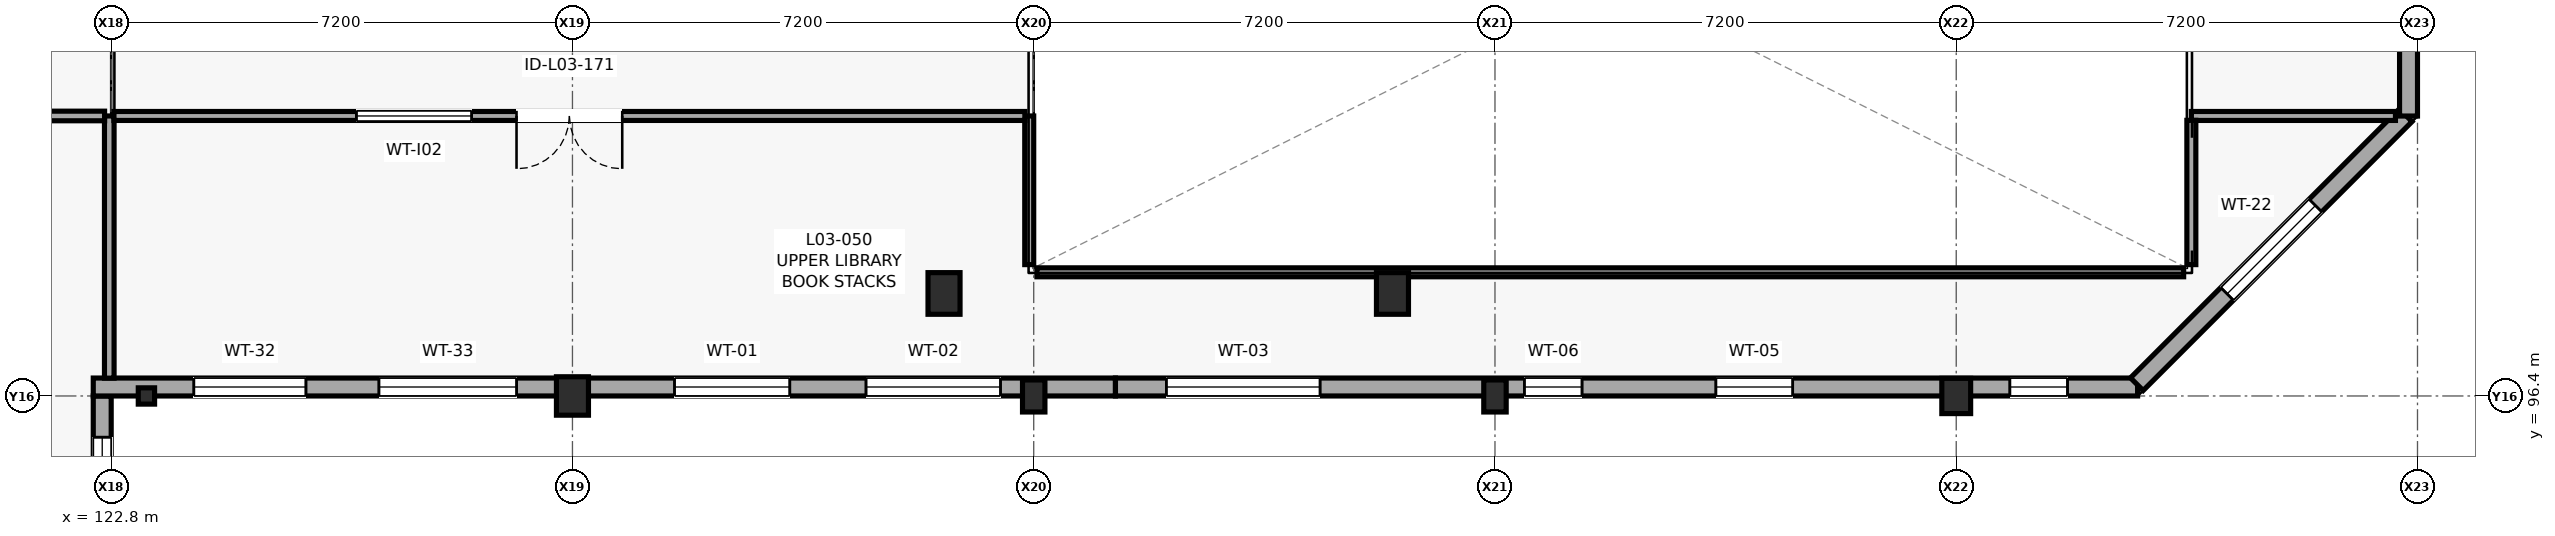
"""IFC4 building model, lengths in metres.
Left out: names, types, materials, properties, quantities, classifications, styles, units other than length and angle.
Written with IfcOpenShell. Run it as: python <this file> out.ifc"""

import sys

from ifc_helpers import new_model, si_unit, direction, frame, frame_2d, origin, origin_2d, place, context, subcontext, project, spatial, rectangle, i_section, extrude, element, fill, save


model = new_model("IFC4")
c1 = context("Model", 3, precision=1e-05, world=origin(), true_north=direction((0.0, 1.0)))
c2 = subcontext(c1, "Body", "Model", "MODEL_VIEW")
j1 = project(units=[si_unit("LENGTHUNIT", "METRE"), si_unit("PLANEANGLEUNIT", "RADIAN")], contexts=[c1])
p1 = place(None, origin())
s1 = spatial("IfcSite", under=j1, at=p1, CompositionType="ELEMENT")
p2 = place(p1, origin())
s2 = spatial("IfcBuilding", under=s1, at=p2, CompositionType="ELEMENT")
p3 = place(p2, frame((0.0, 0.0, 12.2)))
s3 = spatial("IfcBuildingStorey", under=s2, at=p3, CompositionType="ELEMENT", Elevation=12.2)
p4 = place(p3, frame((123.35, 96.4, 0.0), z_axis=(0.0, 0.0, 1.0), x_axis=(1.0, 0.0, 0.0)))
e1 = element("IfcColumn", 1, at=p4, inside=s3, PredefinedType="COLUMN", context=c2, shape_type="SweptSolid", body=[
    extrude(i_section(OverallWidth=0.255, OverallDepth=0.254, WebThickness=0.009, FlangeThickness=0.014, FilletRadius=0.013, at=origin_2d()), origin(), (0.0, 0.0, 1.0), 4.0),
])
p5 = place(p3, frame((130.0, 96.4, 0.0), z_axis=(0.0, 0.0, 1.0), x_axis=(1.0, 0.0, 0.0)))
e2 = element("IfcColumn", 2, at=p5, inside=s3, PredefinedType="PILASTER", context=c2, shape_type="SweptSolid", body=[
    extrude(rectangle(XDim=0.5, YDim=0.6, at=origin_2d()), origin(), (0.0, 0.0, 1.0), 4.0),
])
p6 = place(p3, frame((135.8, 98.0, 0.0), z_axis=(0.0, 0.0, 1.0), x_axis=(1.0, 0.0, 0.0)))
e3 = element("IfcColumn", 3, at=p6, inside=s3, PredefinedType="COLUMN", context=c2, shape_type="SweptSolid", body=[
    extrude(rectangle(XDim=0.5, YDim=0.65, at=origin_2d()), origin(), (0.0, 0.0, 1.0), 4.0),
])
p7 = place(p3, frame((137.2, 96.4, 0.0), z_axis=(0.0, 0.0, 1.0), x_axis=(1.0, 0.0, 0.0)))
e4 = element("IfcColumn", 4, at=p7, inside=s3, PredefinedType="PILASTER", context=c2, shape_type="SweptSolid", body=[
    extrude(rectangle(XDim=0.35, YDim=0.5, at=origin_2d()), origin(), (0.0, 0.0, 1.0), 4.0),
])
p8 = place(p3, frame((142.8, 98.0, 0.0), z_axis=(0.0, 0.0, 1.0), x_axis=(1.0, 0.0, 0.0)))
e5 = element("IfcColumn", 5, at=p8, inside=s3, PredefinedType="COLUMN", context=c2, shape_type="SweptSolid", body=[
    extrude(rectangle(XDim=0.5, YDim=0.65, at=origin_2d()), origin(), (0.0, 0.0, 1.0), 4.0),
])
p9 = place(p3, frame((144.4, 96.4, 0.0), z_axis=(0.0, 0.0, 1.0), x_axis=(1.0, 0.0, 0.0)))
e6 = element("IfcColumn", 6, at=p9, inside=s3, PredefinedType="PILASTER", context=c2, shape_type="SweptSolid", body=[
    extrude(rectangle(XDim=0.35, YDim=0.5, at=origin_2d()), origin(), (0.0, 0.0, 1.0), 4.0),
])
p10 = place(p3, frame((151.6, 96.4, 0.0), z_axis=(0.0, 0.0, 1.0), x_axis=(1.0, 0.0, 0.0)))
e7 = element("IfcColumn", 7, at=p10, inside=s3, PredefinedType="PILASTER", context=c2, shape_type="SweptSolid", body=[
    extrude(rectangle(XDim=0.45, YDim=0.55, at=origin_2d()), origin(), (0.0, 0.0, 1.0), 4.0),
])
p11 = place(p3, frame((122.66, 84.14, 0.0), z_axis=(0.0, 0.0, 1.0), x_axis=(0.0, 1.0, 0.0)))
e8 = element("IfcWall", 8, at=p11, inside=s3, PredefinedType="SOLIDWALL", context=c2, shape_type="SweptSolid", body=[
    extrude(rectangle(XDim=12.26, YDim=0.28, at=frame_2d((6.13, 0.0))), origin(), (0.0, 0.0, 1.0), 3.165),
])
p12 = place(p11, frame((2.343, 0.0, 0.75)))
e9 = element("IfcOpeningElement", 9, at=p12, cuts=e8, PredefinedType="OPENING", context=c2, shape_type="SweptSolid", body=[
    extrude(rectangle(XDim=1.1, YDim=2.1, at=frame_2d((0.55, 1.05))), frame((0.0, 0.15, 0.0), z_axis=(0.0, -1.0, 0.0), x_axis=(1.0, 0.0, 0.0)), (0.0, 0.0, 1.0), 0.3),
])
p13 = place(p11, frame((5.58, 0.0, 0.75)))
e10 = element("IfcOpeningElement", 10, at=p13, cuts=e8, PredefinedType="OPENING", context=c2, shape_type="SweptSolid", body=[
    extrude(rectangle(XDim=1.1, YDim=2.1, at=frame_2d((0.55, 1.05))), frame((0.0, 0.15, 0.0), z_axis=(0.0, -1.0, 0.0), x_axis=(1.0, 0.0, 0.0)), (0.0, 0.0, 1.0), 0.3),
])
p14 = place(p11, frame((10.517, 0.0, 0.75)))
e11 = element("IfcOpeningElement", 11, at=p14, cuts=e8, PredefinedType="OPENING", context=c2, shape_type="SweptSolid", body=[
    extrude(rectangle(XDim=1.1, YDim=2.1, at=frame_2d((0.55, 1.05))), frame((0.0, 0.15, 0.0), z_axis=(0.0, -1.0, 0.0), x_axis=(1.0, 0.0, 0.0)), (0.0, 0.0, 1.0), 0.3),
])
p15 = place(p3, frame((122.52, 96.54, 0.0), z_axis=(0.0, 0.0, 1.0), x_axis=(1.0, 0.0, 0.0)))
e12 = element("IfcWall", 12, at=p15, inside=s3, PredefinedType="SOLIDWALL", context=c2, shape_type="SweptSolid", body=[
    extrude(rectangle(XDim=15.956, YDim=0.28, at=frame_2d((7.978, 0.0))), origin(), (0.0, 0.0, 1.0), 2.815),
])
p16 = place(p15, frame((1.57, 0.0, 0.65)))
e13 = element("IfcOpeningElement", 13, at=p16, cuts=e12, PredefinedType="OPENING", context=c2, shape_type="SweptSolid", body=[
    extrude(rectangle(XDim=1.75, YDim=2.05, at=frame_2d((0.875, 1.025))), frame((0.0, 0.15, 0.0), z_axis=(0.0, -1.0, 0.0), x_axis=(1.0, 0.0, 0.0)), (0.0, 0.0, 1.0), 0.3),
])
p17 = place(p15, frame((4.459, 0.0, 0.725)))
e14 = element("IfcOpeningElement", 14, at=p17, cuts=e12, PredefinedType="OPENING", context=c2, shape_type="SweptSolid", body=[
    extrude(rectangle(XDim=2.15, YDim=1.95, at=frame_2d((1.075, 0.975))), frame((0.0, 0.15, 0.0), z_axis=(0.0, -1.0, 0.0), x_axis=(1.0, 0.0, 0.0)), (0.0, 0.0, 1.0), 0.3),
])
p18 = place(p15, frame((9.073, 0.0, 0.85)))
e15 = element("IfcOpeningElement", 15, at=p18, cuts=e12, PredefinedType="OPENING", context=c2, shape_type="SweptSolid", body=[
    extrude(rectangle(XDim=1.8, YDim=1.8, at=frame_2d((0.9, 0.9))), frame((0.0, 0.15, 0.0), z_axis=(0.0, -1.0, 0.0), x_axis=(1.0, 0.0, 0.0)), (0.0, 0.0, 1.0), 0.3),
])
p19 = place(p15, frame((12.062, 0.0, 0.85)))
e16 = element("IfcOpeningElement", 16, at=p19, cuts=e12, PredefinedType="OPENING", context=c2, shape_type="SweptSolid", body=[
    extrude(rectangle(XDim=2.1, YDim=1.8, at=frame_2d((1.05, 0.9))), frame((0.0, 0.15, 0.0), z_axis=(0.0, -1.0, 0.0), x_axis=(1.0, 0.0, 0.0)), (0.0, 0.0, 1.0), 0.3),
])
p20 = place(p3, frame((138.476, 96.54, 0.0), z_axis=(0.0, 0.0, 1.0), x_axis=(1.0, 0.0, 0.0)))
e17 = element("IfcWall", 17, at=p20, inside=s3, PredefinedType="SOLIDWALL", context=c2, shape_type="SweptSolid", body=[
    extrude(rectangle(XDim=15.955, YDim=0.28, at=frame_2d((7.978, 0.0))), origin(), (0.0, 0.0, 1.0), 2.815),
])
p21 = place(p20, frame((0.794, 0.0, 0.825)))
e18 = element("IfcOpeningElement", 18, at=p21, cuts=e17, PredefinedType="OPENING", context=c2, shape_type="SweptSolid", body=[
    extrude(rectangle(XDim=2.4, YDim=1.85, at=frame_2d((1.2, 0.925))), frame((0.0, 0.15, 0.0), z_axis=(0.0, -1.0, 0.0), x_axis=(1.0, 0.0, 0.0)), (0.0, 0.0, 1.0), 0.3),
])
p22 = place(p20, frame((6.383, 0.0, 1.05)))
e19 = element("IfcOpeningElement", 19, at=p22, cuts=e17, PredefinedType="OPENING", context=c2, shape_type="SweptSolid", body=[
    extrude(rectangle(XDim=0.9, YDim=1.5, at=frame_2d((0.45, 0.75))), frame((0.0, 0.15, 0.0), z_axis=(0.0, -1.0, 0.0), x_axis=(1.0, 0.0, 0.0)), (0.0, 0.0, 1.0), 0.3),
])
p23 = place(p20, frame((9.372, 0.0, 0.85)))
e20 = element("IfcOpeningElement", 20, at=p23, cuts=e17, PredefinedType="OPENING", context=c2, shape_type="SweptSolid", body=[
    extrude(rectangle(XDim=1.2, YDim=1.65, at=frame_2d((0.6, 0.825))), frame((0.0, 0.15, 0.0), z_axis=(0.0, -1.0, 0.0), x_axis=(1.0, 0.0, 0.0)), (0.0, 0.0, 1.0), 0.3),
])
p24 = place(p20, frame((13.961, 0.0, 1.05)))
e21 = element("IfcOpeningElement", 21, at=p24, cuts=e17, PredefinedType="OPENING", context=c2, shape_type="SweptSolid", body=[
    extrude(rectangle(XDim=0.9, YDim=1.5, at=frame_2d((0.45, 0.75))), frame((0.0, 0.15, 0.0), z_axis=(0.0, -1.0, 0.0), x_axis=(1.0, 0.0, 0.0)), (0.0, 0.0, 1.0), 0.3),
])
p25 = place(p3, frame((154.419, 96.584, 0.0), z_axis=(0.0, 0.0, 1.0), x_axis=(0.707106781187, 0.707106781187, 0.0)))
e22 = element("IfcWall", 22, at=p25, inside=s3, PredefinedType="SOLIDWALL", context=c2, shape_type="SweptSolid", body=[
    extrude(rectangle(XDim=5.936, YDim=0.28, at=frame_2d((2.968, 0.0))), origin(), (0.0, 0.0, 1.0), 3.78),
])
p26 = place(p25, frame((1.993, 0.0, 1.05)))
e23 = element("IfcOpeningElement", 23, at=p26, cuts=e22, PredefinedType="OPENING", context=c2, shape_type="SweptSolid", body=[
    extrude(rectangle(XDim=1.95, YDim=1.5, at=frame_2d((0.975, 0.75))), frame((0.0, 0.15, 0.0), z_axis=(0.0, -1.0, 0.0), x_axis=(1.0, 0.0, 0.0)), (0.0, 0.0, 1.0), 0.3),
])
p27 = place(p3, frame((158.66, 100.769, 0.0), z_axis=(0.0, 0.0, 1.0), x_axis=(0.0, 1.0, 0.0)))
e24 = element("IfcWall", 24, at=p27, inside=s3, PredefinedType="SOLIDWALL", context=c2, shape_type="SweptSolid", body=[
    extrude(rectangle(XDim=6.862, YDim=0.28, at=frame_2d((3.431, 0.0))), origin(), (0.0, 0.0, 1.0), 3.78),
])
p28 = place(p27, frame((1.065, 0.0, 1.05)))
e25 = element("IfcOpeningElement", 25, at=p28, cuts=e24, PredefinedType="OPENING", context=c2, shape_type="SweptSolid", body=[
    extrude(rectangle(XDim=1.3, YDim=1.6, at=frame_2d((0.65, 0.8))), frame((0.0, 0.15, 0.0), z_axis=(0.0, -1.0, 0.0), x_axis=(1.0, 0.0, 0.0)), (0.0, 0.0, 1.0), 0.3),
])
p29 = place(p27, frame((4.421, 0.0, 0.85)))
e26 = element("IfcOpeningElement", 26, at=p29, cuts=e24, PredefinedType="OPENING", context=c2, shape_type="SweptSolid", body=[
    extrude(rectangle(XDim=1.45, YDim=1.7, at=frame_2d((0.725, 0.85))), frame((0.0, 0.15, 0.0), z_axis=(0.0, -1.0, 0.0), x_axis=(1.0, 0.0, 0.0)), (0.0, 0.0, 1.0), 0.3),
])
p30 = place(p3, frame((122.77, 96.678, 0.0), z_axis=(0.0, 0.0, 1.0), x_axis=(0.0, 1.0, 0.0)))
e27 = element("IfcWall", 27, at=p30, inside=s3, PredefinedType="PARTITIONING", context=c2, shape_type="SweptSolid", body=[
    extrude(rectangle(XDim=4.092, YDim=0.15, at=frame_2d((2.046, 0.0))), origin(), (0.0, 0.0, 1.0), 3.715),
])
p31 = place(p3, frame((122.697, 100.77, 0.0), z_axis=(0.0, 0.0, 1.0), x_axis=(-1.0, 0.0, 0.0)))
e28 = element("IfcWall", 28, at=p31, inside=s3, PredefinedType="PARTITIONING", context=c2, shape_type="SweptSolid", body=[
    extrude(rectangle(XDim=4.009, YDim=0.15, at=frame_2d((2.004, 0.0))), origin(), (0.0, 0.0, 1.0), 3.715),
])
p32 = place(p3, frame((137.13, 98.45, 0.0), z_axis=(0.0, 0.0, 1.0), x_axis=(0.0, 1.0, 0.0)))
e29 = element("IfcWall", 29, at=p32, inside=s3, PredefinedType="PARTITIONING", context=c2, shape_type="SweptSolid", body=[
    extrude(rectangle(XDim=2.32, YDim=0.14, at=frame_2d((1.16, 0.0))), origin(), (0.0, 0.0, 1.0), 3.165),
])
p33 = place(p3, frame((137.062, 100.77, 0.0), z_axis=(0.0, 0.0, 1.0), x_axis=(-1.0, 0.0, 0.0)))
e30 = element("IfcWall", 30, at=p33, inside=s3, PredefinedType="PARTITIONING", context=c2, shape_type="SweptSolid", body=[
    extrude(rectangle(XDim=14.219, YDim=0.14, at=frame_2d((7.109, 0.0))), origin(), (0.0, 0.0, 1.0), 3.715),
])
p34 = place(p33, frame((6.285, 0.0, 0.0)))
e31 = element("IfcOpeningElement", 31, at=p34, cuts=e30, PredefinedType="OPENING", context=c2, shape_type="SweptSolid", body=[
    extrude(rectangle(XDim=1.65, YDim=2.32, at=frame_2d((0.825, 1.16))), frame((0.0, 0.08, 0.0), z_axis=(0.0, -1.0, 0.0), x_axis=(1.0, 0.0, 0.0)), (0.0, 0.0, 1.0), 0.16),
])
p35 = place(p33, frame((8.635, 0.0, 1.05)))
e32 = element("IfcOpeningElement", 32, at=p35, cuts=e30, PredefinedType="OPENING", context=c2, shape_type="SweptSolid", body=[
    extrude(rectangle(XDim=1.8, YDim=1.2, at=frame_2d((0.9, 0.6))), frame((0.0, 0.08, 0.0), z_axis=(0.0, -1.0, 0.0), x_axis=(1.0, 0.0, 0.0)), (0.0, 0.0, 1.0), 0.16),
])
p36 = place(p3, frame((158.456, 100.77, 0.0), z_axis=(0.0, 0.0, 1.0), x_axis=(-1.0, 0.0, 0.0)))
e33 = element("IfcWall", 33, at=p36, inside=s3, PredefinedType="PARTITIONING", context=c2, shape_type="SweptSolid", body=[
    extrude(rectangle(XDim=3.186, YDim=0.14, at=frame_2d((1.593, 0.0))), origin(), (0.0, 0.0, 1.0), 3.715),
])
p37 = place(p3, frame((155.27, 100.702, 0.0), z_axis=(0.0, 0.0, 1.0), x_axis=(0.0, -1.0, 0.0)))
e34 = element("IfcWall", 34, at=p37, inside=s3, PredefinedType="PARTITIONING", context=c2, shape_type="SweptSolid", body=[
    extrude(rectangle(XDim=2.252, YDim=0.14, at=frame_2d((1.126, 0.0))), origin(), (0.0, 0.0, 1.0), 3.715),
])
p38 = place(p3, frame((155.15, 98.33, 0.0), z_axis=(0.0, 0.0, 1.0), x_axis=(-1.0, 0.0, 0.0)))
e35 = element("IfcWall", 35, at=p38, inside=s3, PredefinedType="PARTITIONING", context=c2, shape_type="SweptSolid", body=[
    extrude(rectangle(XDim=17.9, YDim=0.14, at=frame_2d((8.95, 0.0))), origin(), (0.0, 0.0, 1.0), 3.715),
])
p39 = place(p14, origin())
e36 = element("IfcWindow", 36, at=p39, inside=s3, PartitioningType="SINGLE_PANEL", PredefinedType="WINDOW", context=c2, shape_type="SweptSolid", body=[
    extrude(rectangle(XDim=1.1, YDim=2.1, at=frame_2d((0.55, 1.05))), frame((0.0, 0.03, 0.0), z_axis=(0.0, -1.0, 0.0), x_axis=(1.0, 0.0, 0.0)), (0.0, 0.0, 1.0), 0.06),
])
fill(e11, e36)
p40 = place(p16, origin())
e37 = element("IfcWindow", 37, at=p40, inside=s3, PartitioningType="SINGLE_PANEL", PredefinedType="WINDOW", context=c2, shape_type="SweptSolid", body=[
    extrude(rectangle(XDim=1.75, YDim=2.05, at=frame_2d((0.875, 1.025))), frame((0.0, 0.03, 0.0), z_axis=(0.0, -1.0, 0.0), x_axis=(1.0, 0.0, 0.0)), (0.0, 0.0, 1.0), 0.06),
])
fill(e13, e37)
p41 = place(p17, origin())
e38 = element("IfcWindow", 38, at=p41, inside=s3, PartitioningType="SINGLE_PANEL", PredefinedType="WINDOW", context=c2, shape_type="SweptSolid", body=[
    extrude(rectangle(XDim=2.15, YDim=1.95, at=frame_2d((1.075, 0.975))), frame((0.0, 0.03, 0.0), z_axis=(0.0, -1.0, 0.0), x_axis=(1.0, 0.0, 0.0)), (0.0, 0.0, 1.0), 0.06),
])
fill(e14, e38)
p42 = place(p18, origin())
e39 = element("IfcWindow", 39, at=p42, inside=s3, PartitioningType="SINGLE_PANEL", PredefinedType="WINDOW", context=c2, shape_type="SweptSolid", body=[
    extrude(rectangle(XDim=1.8, YDim=1.8, at=frame_2d((0.9, 0.9))), frame((0.0, 0.03, 0.0), z_axis=(0.0, -1.0, 0.0), x_axis=(1.0, 0.0, 0.0)), (0.0, 0.0, 1.0), 0.06),
])
fill(e15, e39)
p43 = place(p19, origin())
e40 = element("IfcWindow", 40, at=p43, inside=s3, PartitioningType="SINGLE_PANEL", PredefinedType="WINDOW", context=c2, shape_type="SweptSolid", body=[
    extrude(rectangle(XDim=2.1, YDim=1.8, at=frame_2d((1.05, 0.9))), frame((0.0, 0.03, 0.0), z_axis=(0.0, -1.0, 0.0), x_axis=(1.0, 0.0, 0.0)), (0.0, 0.0, 1.0), 0.06),
])
fill(e16, e40)
p44 = place(p21, origin())
e41 = element("IfcWindow", 41, at=p44, inside=s3, PartitioningType="SINGLE_PANEL", PredefinedType="WINDOW", context=c2, shape_type="SweptSolid", body=[
    extrude(rectangle(XDim=2.4, YDim=1.85, at=frame_2d((1.2, 0.925))), frame((0.0, 0.03, 0.0), z_axis=(0.0, -1.0, 0.0), x_axis=(1.0, 0.0, 0.0)), (0.0, 0.0, 1.0), 0.06),
])
fill(e18, e41)
p45 = place(p22, origin())
e42 = element("IfcWindow", 42, at=p45, inside=s3, PartitioningType="SINGLE_PANEL", PredefinedType="WINDOW", context=c2, shape_type="SweptSolid", body=[
    extrude(rectangle(XDim=0.9, YDim=1.5, at=frame_2d((0.45, 0.75))), frame((0.0, 0.03, 0.0), z_axis=(0.0, -1.0, 0.0), x_axis=(1.0, 0.0, 0.0)), (0.0, 0.0, 1.0), 0.06),
])
fill(e19, e42)
p46 = place(p23, origin())
e43 = element("IfcWindow", 43, at=p46, inside=s3, PartitioningType="SINGLE_PANEL", PredefinedType="WINDOW", context=c2, shape_type="SweptSolid", body=[
    extrude(rectangle(XDim=1.2, YDim=1.65, at=frame_2d((0.6, 0.825))), frame((0.0, 0.03, 0.0), z_axis=(0.0, -1.0, 0.0), x_axis=(1.0, 0.0, 0.0)), (0.0, 0.0, 1.0), 0.06),
])
fill(e20, e43)
p47 = place(p24, origin())
e44 = element("IfcWindow", 44, at=p47, inside=s3, PartitioningType="SINGLE_PANEL", PredefinedType="WINDOW", context=c2, shape_type="SweptSolid", body=[
    extrude(rectangle(XDim=0.9, YDim=1.5, at=frame_2d((0.45, 0.75))), frame((0.0, 0.03, 0.0), z_axis=(0.0, -1.0, 0.0), x_axis=(1.0, 0.0, 0.0)), (0.0, 0.0, 1.0), 0.06),
])
fill(e21, e44)
p48 = place(p26, origin())
e45 = element("IfcWindow", 45, at=p48, inside=s3, PartitioningType="SINGLE_PANEL", PredefinedType="WINDOW", context=c2, shape_type="SweptSolid", body=[
    extrude(rectangle(XDim=1.95, YDim=1.5, at=frame_2d((0.975, 0.75))), frame((0.0, 0.03, 0.0), z_axis=(0.0, -1.0, 0.0), x_axis=(1.0, 0.0, 0.0)), (0.0, 0.0, 1.0), 0.06),
])
fill(e23, e45)
p49 = place(p34, origin())
e46 = element("IfcDoor", 46, at=p49, inside=s3, OperationType="DOUBLE_DOOR_SINGLE_SWING", PredefinedType="DOOR", context=c2, shape_type="SweptSolid", body=[
    extrude(rectangle(XDim=1.65, YDim=2.32, at=frame_2d((0.825, 1.16))), frame((0.0, 0.025, 0.0), z_axis=(0.0, -1.0, 0.0), x_axis=(1.0, 0.0, 0.0)), (0.0, 0.0, 1.0), 0.05),
])
fill(e31, e46)
p50 = place(p35, origin())
e47 = element("IfcWindow", 47, at=p50, inside=s3, PartitioningType="SINGLE_PANEL", PredefinedType="WINDOW", context=c2, shape_type="SweptSolid", body=[
    extrude(rectangle(XDim=1.8, YDim=1.2, at=frame_2d((0.9, 0.6))), frame((0.0, 0.03, 0.0), z_axis=(0.0, -1.0, 0.0), x_axis=(1.0, 0.0, 0.0)), (0.0, 0.0, 1.0), 0.06),
])
fill(e32, e47)
save(model, sys.argv[1])
